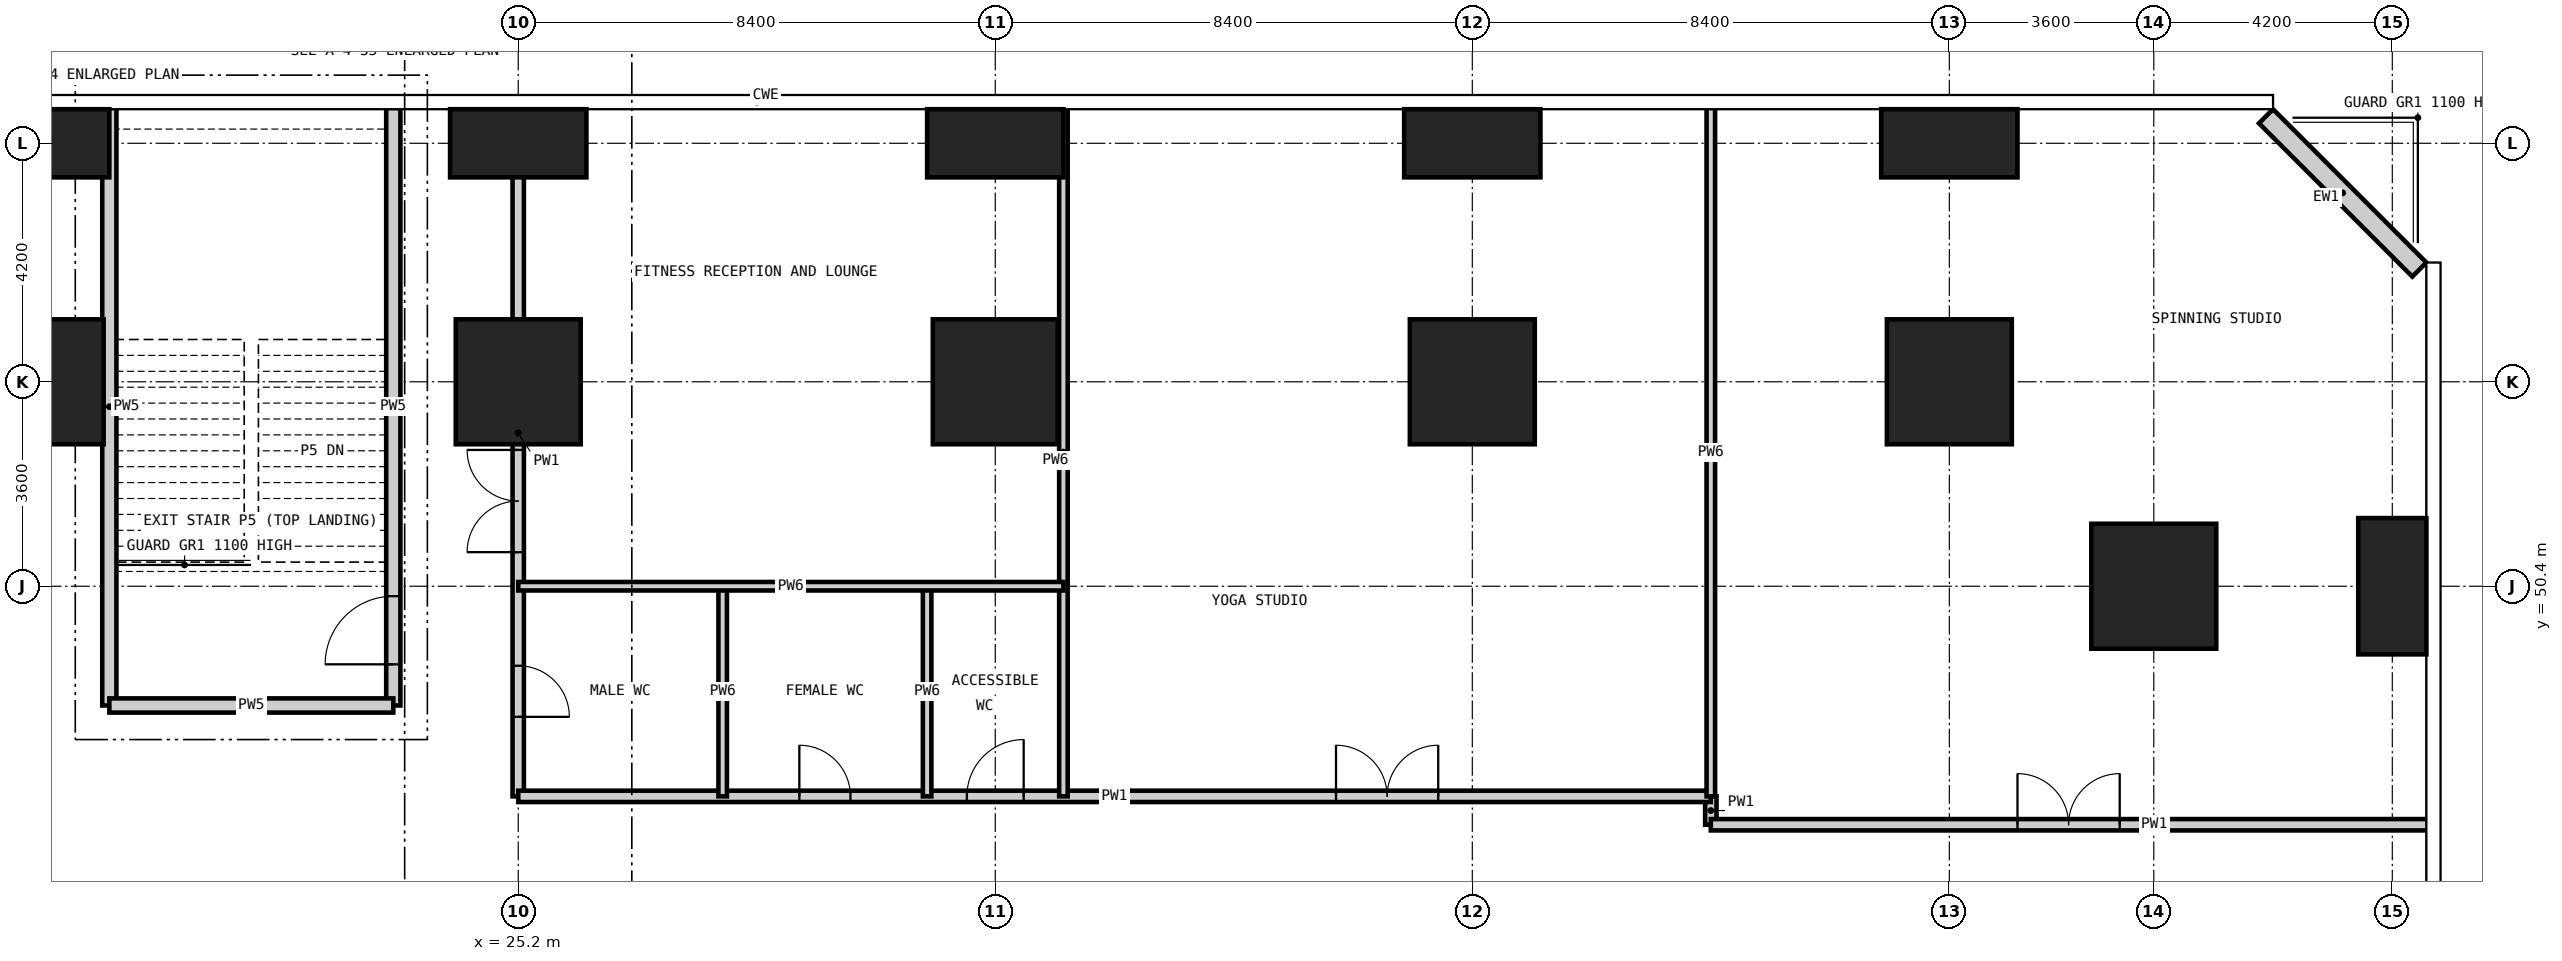
"""IFC4 building model, lengths in metres.
Left out: names, types, materials, properties, quantities, classifications, styles, units other than length and angle.
Written with IfcOpenShell. Run it as: python <this file> out.ifc"""

import sys

from ifc_helpers import new_model, si_unit, direction, frame, frame_2d, origin, origin_2d, place, context, subcontext, project, spatial, rectangle, extrude, element, fill, save


model = new_model("IFC4")
c1 = context("Model", 3, precision=1e-05, world=origin(), true_north=direction((0.0, 1.0)))
c2 = subcontext(c1, "Body", "Model", "MODEL_VIEW")
j1 = project(units=[si_unit("LENGTHUNIT", "METRE"), si_unit("PLANEANGLEUNIT", "RADIAN")], contexts=[c1])
p1 = place(None, origin())
s1 = spatial("IfcSite", under=j1, at=p1, CompositionType="ELEMENT")
p2 = place(p1, origin())
s2 = spatial("IfcBuilding", under=s1, at=p2, CompositionType="ELEMENT")
p3 = place(p2, frame((0.0, 0.0, 22.0)))
s3 = spatial("IfcBuildingStorey", under=s2, at=p3, CompositionType="ELEMENT", Elevation=22.0)
p4 = place(p3, frame((16.8, 54.0, -0.35), z_axis=(0.0, 0.0, 1.0), x_axis=(1.0, 0.0, 0.0)))
e1 = element("IfcColumn", 1, at=p4, inside=s3, PredefinedType="COLUMN", context=c2, shape_type="SweptSolid", body=[
    extrude(rectangle(XDim=2.2, YDim=2.2, at=origin_2d()), origin(), (0.0, 0.0, 1.0), 5.0),
])
p5 = place(p3, frame((16.8, 58.2, -0.35), z_axis=(0.0, 0.0, 1.0), x_axis=(1.0, 0.0, 0.0)))
e2 = element("IfcColumn", 2, at=p5, inside=s3, PredefinedType="COLUMN", context=c2, shape_type="SweptSolid", body=[
    extrude(rectangle(XDim=2.4, YDim=1.2, at=origin_2d()), origin(), (0.0, 0.0, 1.0), 5.0),
])
p6 = place(p3, frame((25.2, 54.0, -0.35), z_axis=(0.0, 0.0, 1.0), x_axis=(1.0, 0.0, 0.0)))
e3 = element("IfcColumn", 3, at=p6, inside=s3, PredefinedType="COLUMN", context=c2, shape_type="SweptSolid", body=[
    extrude(rectangle(XDim=2.2, YDim=2.2, at=origin_2d()), origin(), (0.0, 0.0, 1.0), 5.0),
])
p7 = place(p3, frame((25.2, 58.2, -0.35), z_axis=(0.0, 0.0, 1.0), x_axis=(1.0, 0.0, 0.0)))
e4 = element("IfcColumn", 4, at=p7, inside=s3, PredefinedType="COLUMN", context=c2, shape_type="SweptSolid", body=[
    extrude(rectangle(XDim=2.4, YDim=1.2, at=origin_2d()), origin(), (0.0, 0.0, 1.0), 5.0),
])
p8 = place(p3, frame((33.6, 54.0, -0.35), z_axis=(0.0, 0.0, 1.0), x_axis=(1.0, 0.0, 0.0)))
e5 = element("IfcColumn", 5, at=p8, inside=s3, PredefinedType="COLUMN", context=c2, shape_type="SweptSolid", body=[
    extrude(rectangle(XDim=2.2, YDim=2.2, at=origin_2d()), origin(), (0.0, 0.0, 1.0), 5.0),
])
p9 = place(p3, frame((33.6, 58.2, -0.35), z_axis=(0.0, 0.0, 1.0), x_axis=(1.0, 0.0, 0.0)))
e6 = element("IfcColumn", 6, at=p9, inside=s3, PredefinedType="COLUMN", context=c2, shape_type="SweptSolid", body=[
    extrude(rectangle(XDim=2.4, YDim=1.2, at=origin_2d()), origin(), (0.0, 0.0, 1.0), 5.0),
])
p10 = place(p3, frame((42.0, 54.0, -0.35), z_axis=(0.0, 0.0, 1.0), x_axis=(1.0, 0.0, 0.0)))
e7 = element("IfcColumn", 7, at=p10, inside=s3, PredefinedType="COLUMN", context=c2, shape_type="SweptSolid", body=[
    extrude(rectangle(XDim=2.2, YDim=2.2, at=origin_2d()), origin(), (0.0, 0.0, 1.0), 5.0),
])
p11 = place(p3, frame((42.0, 58.2, -0.35), z_axis=(0.0, 0.0, 1.0), x_axis=(1.0, 0.0, 0.0)))
e8 = element("IfcColumn", 8, at=p11, inside=s3, PredefinedType="COLUMN", context=c2, shape_type="SweptSolid", body=[
    extrude(rectangle(XDim=2.4, YDim=1.2, at=origin_2d()), origin(), (0.0, 0.0, 1.0), 5.0),
])
p12 = place(p3, frame((50.4, 54.0, -0.35), z_axis=(0.0, 0.0, 1.0), x_axis=(1.0, 0.0, 0.0)))
e9 = element("IfcColumn", 9, at=p12, inside=s3, PredefinedType="COLUMN", context=c2, shape_type="SweptSolid", body=[
    extrude(rectangle(XDim=2.2, YDim=2.2, at=origin_2d()), origin(), (0.0, 0.0, 1.0), 5.0),
])
p13 = place(p3, frame((50.4, 58.2, -0.35), z_axis=(0.0, 0.0, 1.0), x_axis=(1.0, 0.0, 0.0)))
e10 = element("IfcColumn", 10, at=p13, inside=s3, PredefinedType="COLUMN", context=c2, shape_type="SweptSolid", body=[
    extrude(rectangle(XDim=2.4, YDim=1.2, at=origin_2d()), origin(), (0.0, 0.0, 1.0), 5.0),
])
p14 = place(p3, frame((54.0, 50.4, -0.35), z_axis=(0.0, 0.0, 1.0), x_axis=(1.0, 0.0, 0.0)))
e11 = element("IfcColumn", 11, at=p14, inside=s3, PredefinedType="COLUMN", context=c2, shape_type="SweptSolid", body=[
    extrude(rectangle(XDim=2.2, YDim=2.2, at=origin_2d()), origin(), (0.0, 0.0, 1.0), 5.0),
])
p15 = place(p3, frame((58.2, 50.4, -0.35), z_axis=(0.0, 0.0, 1.0), x_axis=(1.0, 0.0, 0.0)))
e12 = element("IfcColumn", 12, at=p15, inside=s3, PredefinedType="COLUMN", context=c2, shape_type="SweptSolid", body=[
    extrude(rectangle(XDim=1.2, YDim=2.4, at=origin_2d()), origin(), (0.0, 0.0, 1.0), 5.0),
])
p16 = place(p3, frame((58.676, 55.976, 0.0), z_axis=(0.0, 0.0, 1.0), x_axis=(-0.707106781187, 0.707106781187, 0.0)))
e13 = element("IfcWall", 13, at=p16, inside=s3, PredefinedType="SOLIDWALL", context=c2, shape_type="SweptSolid", body=[
    extrude(rectangle(XDim=3.818, YDim=0.35, at=frame_2d((1.909, 0.0))), origin(), (0.0, 0.0, 1.0), 4.65),
])
p17 = place(p3, frame((25.2, 46.7, 0.0), z_axis=(0.0, 0.0, 1.0), x_axis=(0.0, 1.0, 0.0)))
e14 = element("IfcWall", 14, at=p17, inside=s3, PredefinedType="PARTITIONING", context=c2, shape_type="SweptSolid", body=[
    extrude(rectangle(XDim=12.123, YDim=0.2, at=frame_2d((6.062, 0.0))), origin(), (0.0, 0.0, 1.0), 4.65),
])
p18 = place(p17, frame((1.4, 0.0, 0.0)))
e15 = element("IfcOpeningElement", 15, at=p18, cuts=e14, PredefinedType="OPENING", context=c2, shape_type="SweptSolid", body=[
    extrude(rectangle(XDim=0.9, YDim=2.1, at=frame_2d((0.45, 1.05))), frame((0.0, 0.11, 0.0), z_axis=(0.0, -1.0, 0.0), x_axis=(1.0, 0.0, 0.0)), (0.0, 0.0, 1.0), 0.22),
])
p19 = place(p17, frame((4.3, 0.0, 0.0)))
e16 = element("IfcOpeningElement", 16, at=p19, cuts=e14, PredefinedType="OPENING", context=c2, shape_type="SweptSolid", body=[
    extrude(rectangle(XDim=1.8, YDim=2.4, at=frame_2d((0.9, 1.2))), frame((0.0, 0.11, 0.0), z_axis=(0.0, -1.0, 0.0), x_axis=(1.0, 0.0, 0.0)), (0.0, 0.0, 1.0), 0.22),
])
p20 = place(p3, frame((46.2, 46.2, 0.0), z_axis=(0.0, 0.0, 1.0), x_axis=(0.0, 1.0, 0.0)))
e17 = element("IfcWall", 17, at=p20, inside=s3, PredefinedType="PARTITIONING", context=c2, shape_type="SweptSolid", body=[
    extrude(rectangle(XDim=0.5, YDim=0.2, at=frame_2d((0.25, 0.0))), origin(), (0.0, 0.0, 1.0), 4.65),
])
p21 = place(p3, frame((46.2, 46.2, 0.0), z_axis=(0.0, 0.0, 1.0), x_axis=(1.0, 0.0, 0.0)))
e18 = element("IfcWall", 18, at=p21, inside=s3, PredefinedType="PARTITIONING", context=c2, shape_type="SweptSolid", body=[
    extrude(rectangle(XDim=12.623, YDim=0.2, at=frame_2d((6.312, 0.0))), origin(), (0.0, 0.0, 1.0), 4.65),
])
p22 = place(p21, frame((5.4, 0.0, 0.0)))
e19 = element("IfcOpeningElement", 19, at=p22, cuts=e18, PredefinedType="OPENING", context=c2, shape_type="SweptSolid", body=[
    extrude(rectangle(XDim=1.8, YDim=2.4, at=frame_2d((0.9, 1.2))), frame((0.0, 0.11, 0.0), z_axis=(0.0, -1.0, 0.0), x_axis=(1.0, 0.0, 0.0)), (0.0, 0.0, 1.0), 0.22),
])
p23 = place(p3, frame((25.2, 46.7, 0.0), z_axis=(0.0, 0.0, 1.0), x_axis=(1.0, 0.0, 0.0)))
e20 = element("IfcWall", 20, at=p23, inside=s3, PredefinedType="PARTITIONING", context=c2, shape_type="SweptSolid", body=[
    extrude(rectangle(XDim=21.0, YDim=0.2, at=frame_2d((10.5, 0.0))), origin(), (0.0, 0.0, 1.0), 4.65),
])
p24 = place(p23, frame((4.95, 0.0, 0.0)))
e21 = element("IfcOpeningElement", 21, at=p24, cuts=e20, PredefinedType="OPENING", context=c2, shape_type="SweptSolid", body=[
    extrude(rectangle(XDim=0.9, YDim=2.1, at=frame_2d((0.45, 1.05))), frame((0.0, 0.11, 0.0), z_axis=(0.0, -1.0, 0.0), x_axis=(1.0, 0.0, 0.0)), (0.0, 0.0, 1.0), 0.22),
])
p25 = place(p23, frame((7.9, 0.0, 0.0)))
e22 = element("IfcOpeningElement", 22, at=p25, cuts=e20, PredefinedType="OPENING", context=c2, shape_type="SweptSolid", body=[
    extrude(rectangle(XDim=1.0, YDim=2.1, at=frame_2d((0.5, 1.05))), frame((0.0, 0.11, 0.0), z_axis=(0.0, -1.0, 0.0), x_axis=(1.0, 0.0, 0.0)), (0.0, 0.0, 1.0), 0.22),
])
p26 = place(p23, frame((14.4, 0.0, 0.0)))
e23 = element("IfcOpeningElement", 23, at=p26, cuts=e20, PredefinedType="OPENING", context=c2, shape_type="SweptSolid", body=[
    extrude(rectangle(XDim=1.8, YDim=2.4, at=frame_2d((0.9, 1.2))), frame((0.0, 0.11, 0.0), z_axis=(0.0, -1.0, 0.0), x_axis=(1.0, 0.0, 0.0)), (0.0, 0.0, 1.0), 0.22),
])
for number, where, z_axis, x_axis in (
    (24, (28.8, 46.7, 0.0), (0.0, 0.0, 1.0), (0.0, 1.0, 0.0)),
    (25, (32.4, 46.7, 0.0), (0.0, 0.0, 1.0), (0.0, 1.0, 0.0)),
):
    element("IfcWall", number, at=place(p3, frame(where, z_axis=z_axis, x_axis=x_axis)), inside=s3, PredefinedType="PARTITIONING", context=c2, shape_type="SweptSolid", body=[
        extrude(rectangle(XDim=3.7, YDim=0.15, at=frame_2d((1.85, 0.0))), origin(), (0.0, 0.0, 1.0), 4.65),
    ])
for number, where, z_axis, x_axis in (
    (26, (34.8, 46.7, 0.0), (0.0, 0.0, 1.0), (0.0, 1.0, 0.0)),
    (27, (46.2, 46.7, 0.0), (0.0, 0.0, 1.0), (0.0, 1.0, 0.0)),
):
    element("IfcWall", number, at=place(p3, frame(where, z_axis=z_axis, x_axis=x_axis)), inside=s3, PredefinedType="PARTITIONING", context=c2, shape_type="SweptSolid", body=[
        extrude(rectangle(XDim=12.123, YDim=0.15, at=frame_2d((6.062, 0.0))), origin(), (0.0, 0.0, 1.0), 4.65),
    ])
p27 = place(p3, frame((25.2, 50.4, 0.0), z_axis=(0.0, 0.0, 1.0), x_axis=(1.0, 0.0, 0.0)))
e28 = element("IfcWall", 28, at=p27, inside=s3, PredefinedType="PARTITIONING", context=c2, shape_type="SweptSolid", body=[
    extrude(rectangle(XDim=9.6, YDim=0.15, at=frame_2d((4.8, 0.0))), origin(), (0.0, 0.0, 1.0), 4.65),
])
p28 = place(p3, frame((18.0, 48.3, 0.0), z_axis=(0.0, 0.0, 1.0), x_axis=(0.0, 1.0, 0.0)))
e29 = element("IfcWall", 29, at=p28, inside=s3, PredefinedType="PARTITIONING", context=c2, shape_type="SweptSolid", body=[
    extrude(rectangle(XDim=10.523, YDim=0.25, at=frame_2d((5.261, 0.0))), origin(), (0.0, 0.0, 1.0), 4.65),
])
p29 = place(p3, frame((23.0, 48.3, 0.0), z_axis=(0.0, 0.0, 1.0), x_axis=(0.0, 1.0, 0.0)))
e30 = element("IfcWall", 30, at=p29, inside=s3, PredefinedType="PARTITIONING", context=c2, shape_type="SweptSolid", body=[
    extrude(rectangle(XDim=10.523, YDim=0.25, at=frame_2d((5.261, 0.0))), origin(), (0.0, 0.0, 1.0), 4.65),
])
p30 = place(p29, frame((0.725, 0.0, 0.0)))
e31 = element("IfcOpeningElement", 31, at=p30, cuts=e30, PredefinedType="OPENING", context=c2, shape_type="SweptSolid", body=[
    extrude(rectangle(XDim=1.2, YDim=2.2, at=frame_2d((0.6, 1.1))), frame((0.0, 0.135, 0.0), z_axis=(0.0, -1.0, 0.0), x_axis=(1.0, 0.0, 0.0)), (0.0, 0.0, 1.0), 0.27),
])
p31 = place(p3, frame((18.0, 48.3, 0.0), z_axis=(0.0, 0.0, 1.0), x_axis=(1.0, 0.0, 0.0)))
e32 = element("IfcWall", 32, at=p31, inside=s3, PredefinedType="PARTITIONING", context=c2, shape_type="SweptSolid", body=[
    extrude(rectangle(XDim=5.0, YDim=0.25, at=frame_2d((2.5, 0.0))), origin(), (0.0, 0.0, 1.0), 4.65),
])
p32 = place(p30, origin())
e33 = element("IfcDoor", 33, at=p32, inside=s3, OperationType="SINGLE_SWING_LEFT", PredefinedType="DOOR", context=c2, shape_type="SweptSolid", body=[
    extrude(rectangle(XDim=1.2, YDim=2.2, at=frame_2d((0.6, 1.1))), frame((0.0, 0.025, 0.0), z_axis=(0.0, -1.0, 0.0), x_axis=(1.0, 0.0, 0.0)), (0.0, 0.0, 1.0), 0.05),
])
fill(e31, e33)
p33 = place(p18, frame((0.9, 0.0, 0.0), z_axis=(0.0, 0.0, 1.0), x_axis=(-1.0, 0.0, 0.0)))
e34 = element("IfcDoor", 34, at=p33, inside=s3, OperationType="SINGLE_SWING_RIGHT", PredefinedType="DOOR", context=c2, shape_type="SweptSolid", body=[
    extrude(rectangle(XDim=0.9, YDim=2.1, at=frame_2d((0.45, 1.05))), frame((0.0, 0.025, 0.0), z_axis=(0.0, -1.0, 0.0), x_axis=(1.0, 0.0, 0.0)), (0.0, 0.0, 1.0), 0.05),
])
fill(e15, e34)
p34 = place(p24, origin())
e35 = element("IfcDoor", 35, at=p34, inside=s3, OperationType="SINGLE_SWING_LEFT", PredefinedType="DOOR", context=c2, shape_type="SweptSolid", body=[
    extrude(rectangle(XDim=0.9, YDim=2.1, at=frame_2d((0.45, 1.05))), frame((0.0, 0.025, 0.0), z_axis=(0.0, -1.0, 0.0), x_axis=(1.0, 0.0, 0.0)), (0.0, 0.0, 1.0), 0.05),
])
fill(e21, e35)
p35 = place(p25, origin())
e36 = element("IfcDoor", 36, at=p35, inside=s3, OperationType="SINGLE_SWING_RIGHT", PredefinedType="DOOR", context=c2, shape_type="SweptSolid", body=[
    extrude(rectangle(XDim=1.0, YDim=2.1, at=frame_2d((0.5, 1.05))), frame((0.0, 0.025, 0.0), z_axis=(0.0, -1.0, 0.0), x_axis=(1.0, 0.0, 0.0)), (0.0, 0.0, 1.0), 0.05),
])
fill(e22, e36)
p36 = place(p26, origin())
e37 = element("IfcDoor", 37, at=p36, inside=s3, OperationType="DOUBLE_DOOR_DOUBLE_SWING", PredefinedType="DOOR", context=c2, shape_type="SweptSolid", body=[
    extrude(rectangle(XDim=1.8, YDim=2.4, at=frame_2d((0.9, 1.2))), frame((0.0, 0.025, 0.0), z_axis=(0.0, -1.0, 0.0), x_axis=(1.0, 0.0, 0.0)), (0.0, 0.0, 1.0), 0.05),
])
fill(e23, e37)
p37 = place(p22, origin())
e38 = element("IfcDoor", 38, at=p37, inside=s3, OperationType="DOUBLE_DOOR_DOUBLE_SWING", PredefinedType="DOOR", context=c2, shape_type="SweptSolid", body=[
    extrude(rectangle(XDim=1.8, YDim=2.4, at=frame_2d((0.9, 1.2))), frame((0.0, 0.025, 0.0), z_axis=(0.0, -1.0, 0.0), x_axis=(1.0, 0.0, 0.0)), (0.0, 0.0, 1.0), 0.05),
])
fill(e19, e38)
p38 = place(p19, origin())
e39 = element("IfcDoor", 39, at=p38, inside=s3, OperationType="DOUBLE_DOOR_DOUBLE_SWING", PredefinedType="DOOR", context=c2, shape_type="SweptSolid", body=[
    extrude(rectangle(XDim=1.8, YDim=2.4, at=frame_2d((0.9, 1.2))), frame((0.0, 0.025, 0.0), z_axis=(0.0, -1.0, 0.0), x_axis=(1.0, 0.0, 0.0)), (0.0, 0.0, 1.0), 0.05),
])
fill(e16, e39)
save(model, sys.argv[1])
